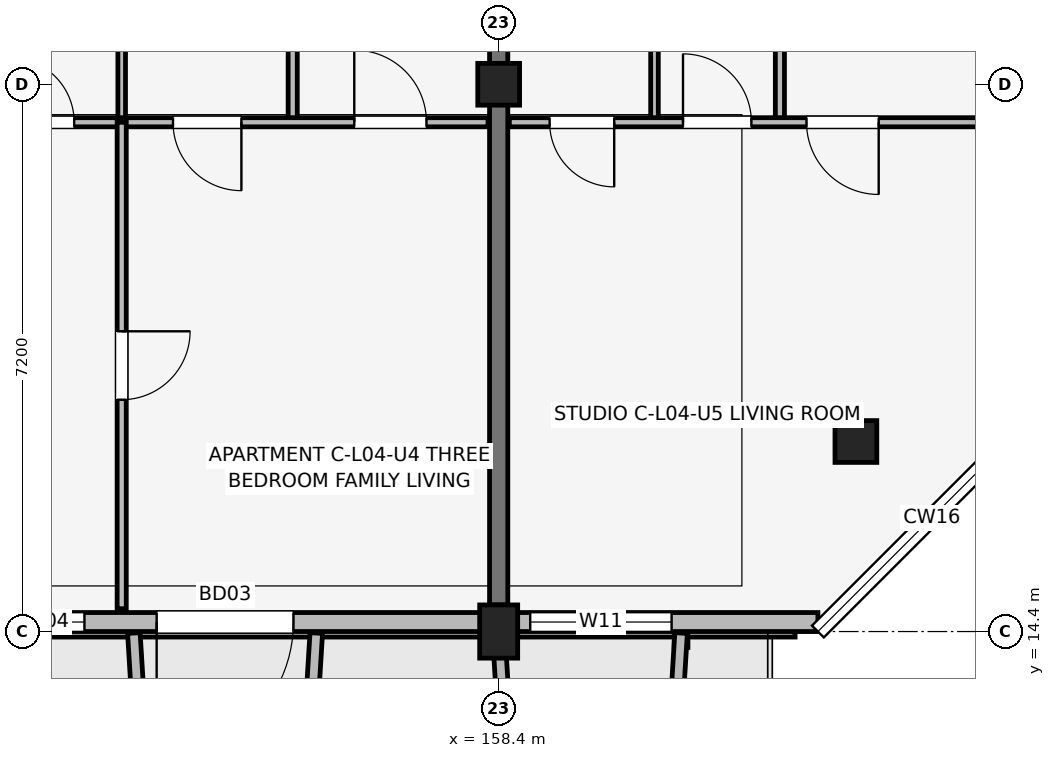
"""IFC4 building model, lengths in metres.
Left out: names, types, materials, properties, quantities, classifications, styles, units other than length and angle.
Written with IfcOpenShell. Run it as: python <this file> out.ifc"""

import sys

from ifc_helpers import new_model, si_unit, direction, frame, frame_2d, origin, origin_2d, place, context, subcontext, project, spatial, rectangle, extrude, element, fill, save


model = new_model("IFC4")
c1 = context("Model", 3, precision=1e-05, world=origin(), true_north=direction((0.0, 1.0)))
c2 = subcontext(c1, "Body", "Model", "MODEL_VIEW")
j1 = project(units=[si_unit("LENGTHUNIT", "METRE"), si_unit("PLANEANGLEUNIT", "RADIAN")], contexts=[c1])
p1 = place(None, origin())
s1 = spatial("IfcSite", under=j1, at=p1, CompositionType="ELEMENT")
p2 = place(p1, origin())
s2 = spatial("IfcBuilding", under=s1, at=p2, CompositionType="ELEMENT")
p3 = place(p2, frame((0.0, 0.0, 15.0)))
s3 = spatial("IfcBuildingStorey", under=s2, at=p3, CompositionType="ELEMENT", Elevation=15.0)
p4 = place(p3, frame((158.4, 14.4, 0.0), z_axis=(0.0, 0.0, 1.0), x_axis=(1.0, 0.0, 0.0)))
e1 = element("IfcColumn", 1, at=p4, inside=s3, PredefinedType="COLUMN", context=c2, shape_type="SweptSolid", body=[
    extrude(rectangle(XDim=0.5, YDim=0.7, at=origin_2d()), origin(), (0.0, 0.0, 1.0), 3.15),
])
for number, where, z_axis, x_axis in (
    (2, (158.4, 21.6, 0.0), (0.0, 0.0, 1.0), (1.0, 0.0, 0.0)),
    (3, (163.1, 16.9, 0.0), (0.0, 0.0, 1.0), (1.0, 0.0, 0.0)),
):
    element("IfcColumn", number, at=place(p3, frame(where, z_axis=z_axis, x_axis=x_axis)), inside=s3, PredefinedType="COLUMN", context=c2, shape_type="SweptSolid", body=[
        extrude(rectangle(XDim=0.55, YDim=0.55, at=origin_2d()), origin(), (0.0, 0.0, 1.0), 3.15),
    ])
p5 = place(p3, frame((158.4, 14.75, 0.0), z_axis=(0.0, 0.0, 1.0), x_axis=(0.0, 1.0, 0.0)))
e4 = element("IfcWall", 4, at=p5, inside=s3, PredefinedType="SHEAR", context=c2, shape_type="SweptSolid", body=[
    extrude(rectangle(XDim=9.4, YDim=0.24, at=frame_2d((4.7, 0.0))), origin(), (0.0, 0.0, 1.0), 3.15),
])
p6 = place(p3, frame((132.6, 14.525, 0.0), z_axis=(0.0, 0.0, 1.0), x_axis=(1.0, 0.0, 0.0)))
e5 = element("IfcWall", 5, at=p6, inside=s3, PredefinedType="SOLIDWALL", context=c2, shape_type="SweptSolid", body=[
    extrude(rectangle(XDim=30.0, YDim=0.25, at=frame_2d((15.0, 0.0))), origin(), (0.0, 0.0, 1.0), 2.43),
])
p7 = place(p6, frame((8.55, 0.0, 0.0), z_axis=(0.0, 0.0, 1.0), x_axis=(-1.0, 0.0, 0.0)))
e6 = element("IfcOpeningElement", 6, at=p7, cuts=e5, PredefinedType="OPENING", context=c2, shape_type="SweptSolid", body=[
    extrude(rectangle(XDim=1.5, YDim=2.15, at=frame_2d((0.75, 1.075))), frame((0.0, 0.135, 0.0), z_axis=(0.0, -1.0, 0.0), x_axis=(1.0, 0.0, 0.0)), (0.0, 0.0, 1.0), 0.27),
])
p8 = place(p6, frame((23.1, 0.0, 0.0), z_axis=(0.0, 0.0, 1.0), x_axis=(-1.0, 0.0, 0.0)))
e7 = element("IfcOpeningElement", 7, at=p8, cuts=e5, PredefinedType="OPENING", context=c2, shape_type="SweptSolid", body=[
    extrude(rectangle(XDim=1.8, YDim=2.15, at=frame_2d((0.9, 1.075))), frame((0.0, 0.135, 0.0), z_axis=(0.0, -1.0, 0.0), x_axis=(1.0, 0.0, 0.0)), (0.0, 0.0, 1.0), 0.27),
])
p9 = place(p6, frame((2.555, 0.0, 0.75)))
e8 = element("IfcOpeningElement", 8, at=p9, cuts=e5, PredefinedType="OPENING", context=c2, shape_type="SweptSolid", body=[
    extrude(rectangle(XDim=1.22, YDim=1.5, at=frame_2d((0.61, 0.75))), frame((0.0, 0.135, 0.0), z_axis=(0.0, -1.0, 0.0), x_axis=(1.0, 0.0, 0.0)), (0.0, 0.0, 1.0), 0.27),
])
p10 = place(p6, frame((5.035, 0.0, 0.75)))
e9 = element("IfcOpeningElement", 9, at=p10, cuts=e5, PredefinedType="OPENING", context=c2, shape_type="SweptSolid", body=[
    extrude(rectangle(XDim=0.6, YDim=1.25, at=frame_2d((0.3, 0.625))), frame((0.0, 0.135, 0.0), z_axis=(0.0, -1.0, 0.0), x_axis=(1.0, 0.0, 0.0)), (0.0, 0.0, 1.0), 0.27),
])
p11 = place(p6, frame((12.3, 0.0, 0.75)))
e10 = element("IfcOpeningElement", 10, at=p11, cuts=e5, PredefinedType="OPENING", context=c2, shape_type="SweptSolid", body=[
    extrude(rectangle(XDim=0.72, YDim=1.35, at=frame_2d((0.36, 0.675))), frame((0.0, 0.135, 0.0), z_axis=(0.0, -1.0, 0.0), x_axis=(1.0, 0.0, 0.0)), (0.0, 0.0, 1.0), 0.27),
])
p12 = place(p6, frame((14.0, 0.0, 0.67)))
e11 = element("IfcOpeningElement", 11, at=p12, cuts=e5, PredefinedType="OPENING", context=c2, shape_type="SweptSolid", body=[
    extrude(rectangle(XDim=2.0, YDim=1.65, at=frame_2d((1.0, 0.825))), frame((0.0, 0.135, 0.0), z_axis=(0.0, -1.0, 0.0), x_axis=(1.0, 0.0, 0.0)), (0.0, 0.0, 1.0), 0.27),
])
p13 = place(p6, frame((19.37, 0.0, 0.75)))
e12 = element("IfcOpeningElement", 12, at=p13, cuts=e5, PredefinedType="OPENING", context=c2, shape_type="SweptSolid", body=[
    extrude(rectangle(XDim=0.98, YDim=1.45, at=frame_2d((0.49, 0.725))), frame((0.0, 0.135, 0.0), z_axis=(0.0, -1.0, 0.0), x_axis=(1.0, 0.0, 0.0)), (0.0, 0.0, 1.0), 0.27),
])
p14 = place(p6, frame((26.215, 0.0, 0.7)))
e13 = element("IfcOpeningElement", 13, at=p14, cuts=e5, PredefinedType="OPENING", context=c2, shape_type="SweptSolid", body=[
    extrude(rectangle(XDim=1.86, YDim=1.6, at=frame_2d((0.93, 0.8))), frame((0.0, 0.135, 0.0), z_axis=(0.0, -1.0, 0.0), x_axis=(1.0, 0.0, 0.0)), (0.0, 0.0, 1.0), 0.27),
])
for number, where, z_axis, x_axis in (
    (14, (153.6, 14.38, 0.0), (0.0, 0.0, 1.0), (0.061, -0.998, 0.0)),
    (15, (156.0, 14.38, 0.0), (0.0, 0.0, 1.0), (-0.061, -0.998, 0.0)),
):
    element("IfcWall", number, at=place(p3, frame(where, z_axis=z_axis, x_axis=x_axis)), inside=s3, PredefinedType="ELEMENTEDWALL", context=c2, shape_type="SweptSolid", body=[
        extrude(rectangle(XDim=1.964, YDim=0.165, at=frame_2d((0.982, 0.0))), origin(), (0.0, 0.0, 1.0), 2.45),
    ])
for number, where, z_axis, x_axis in (
    (16, (158.4, 14.38, 0.0), (0.0, 0.0, 1.0), (0.061, -0.998, 0.0)),
    (17, (160.8, 14.38, 0.0), (0.0, 0.0, 1.0), (-0.061, -0.998, 0.0)),
):
    element("IfcWall", number, at=place(p3, frame(where, z_axis=z_axis, x_axis=x_axis)), inside=s3, PredefinedType="ELEMENTEDWALL", context=c2, shape_type="SweptSolid", body=[
        extrude(rectangle(XDim=1.964, YDim=0.165, at=frame_2d((0.982, 0.0))), origin(), (0.0, 0.0, 1.0), 2.95),
    ])
p15 = place(p3, frame((153.44, 21.1, 0.0), z_axis=(0.0, 0.0, 1.0), x_axis=(0.0, 1.0, 0.0)))
e18 = element("IfcWall", 18, at=p15, inside=s3, PredefinedType="PARTITIONING", context=c2, shape_type="SweptSolid", body=[
    extrude(rectangle(XDim=3.2, YDim=0.1, at=frame_2d((1.6, 0.0))), origin(), (0.0, 0.0, 1.0), 2.375),
])
p16 = place(p3, frame((155.69, 21.1, 0.0), z_axis=(0.0, 0.0, 1.0), x_axis=(0.0, 1.0, 0.0)))
e19 = element("IfcWall", 19, at=p16, inside=s3, PredefinedType="PARTITIONING", context=c2, shape_type="SweptSolid", body=[
    extrude(rectangle(XDim=3.2, YDim=0.12, at=frame_2d((1.6, 0.0))), origin(), (0.0, 0.0, 1.0), 2.375),
])
p17 = place(p3, frame((151.34, 21.1, 0.0), z_axis=(0.0, 0.0, 1.0), x_axis=(1.0, 0.0, 0.0)))
e20 = element("IfcWall", 20, at=p17, inside=s3, PredefinedType="PARTITIONING", context=c2, shape_type="SweptSolid", body=[
    extrude(rectangle(XDim=6.92, YDim=0.12, at=frame_2d((3.46, 0.0))), origin(), (0.0, 0.0, 1.0), 2.38),
])
p18 = place(p17, frame((0.625, 0.0, 0.0)))
e21 = element("IfcOpeningElement", 21, at=p18, cuts=e20, PredefinedType="OPENING", context=c2, shape_type="SweptSolid", body=[
    extrude(rectangle(XDim=0.85, YDim=2.08, at=frame_2d((0.425, 1.04))), frame((0.0, 0.07, 0.0), z_axis=(0.0, -1.0, 0.0), x_axis=(1.0, 0.0, 0.0)), (0.0, 0.0, 1.0), 0.14),
])
p19 = place(p17, frame((3.675, 0.0, 0.0), z_axis=(0.0, 0.0, 1.0), x_axis=(-1.0, 0.0, 0.0)))
e22 = element("IfcOpeningElement", 22, at=p19, cuts=e20, PredefinedType="OPENING", context=c2, shape_type="SweptSolid", body=[
    extrude(rectangle(XDim=0.9, YDim=2.08, at=frame_2d((0.45, 1.04))), frame((0.0, 0.07, 0.0), z_axis=(0.0, -1.0, 0.0), x_axis=(1.0, 0.0, 0.0)), (0.0, 0.0, 1.0), 0.14),
])
p20 = place(p17, frame((5.16, 0.0, 0.0)))
e23 = element("IfcOpeningElement", 23, at=p20, cuts=e20, PredefinedType="OPENING", context=c2, shape_type="SweptSolid", body=[
    extrude(rectangle(XDim=0.95, YDim=2.08, at=frame_2d((0.475, 1.04))), frame((0.0, 0.07, 0.0), z_axis=(0.0, -1.0, 0.0), x_axis=(1.0, 0.0, 0.0)), (0.0, 0.0, 1.0), 0.14),
])
p21 = place(p3, frame((153.44, 14.7, 0.0), z_axis=(0.0, 0.0, 1.0), x_axis=(0.0, 1.0, 0.0)))
e24 = element("IfcWall", 24, at=p21, inside=s3, PredefinedType="PARTITIONING", context=c2, shape_type="SweptSolid", body=[
    extrude(rectangle(XDim=6.4, YDim=0.12, at=frame_2d((3.2, 0.0))), origin(), (0.0, 0.0, 1.0), 2.38),
])
p22 = place(p21, frame((3.65, 0.0, 0.0), z_axis=(0.0, 0.0, 1.0), x_axis=(-1.0, 0.0, 0.0)))
e25 = element("IfcOpeningElement", 25, at=p22, cuts=e24, PredefinedType="OPENING", context=c2, shape_type="SweptSolid", body=[
    extrude(rectangle(XDim=0.9, YDim=2.08, at=frame_2d((0.45, 1.04))), frame((0.0, 0.07, 0.0), z_axis=(0.0, -1.0, 0.0), x_axis=(1.0, 0.0, 0.0)), (0.0, 0.0, 1.0), 0.14),
])
p23 = place(p3, frame((160.45, 21.1, 0.0), z_axis=(0.0, 0.0, 1.0), x_axis=(0.0, 1.0, 0.0)))
e26 = element("IfcWall", 26, at=p23, inside=s3, PredefinedType="PARTITIONING", context=c2, shape_type="SweptSolid", body=[
    extrude(rectangle(XDim=3.2, YDim=0.1, at=frame_2d((1.6, 0.0))), origin(), (0.0, 0.0, 1.0), 2.375),
])
p24 = place(p3, frame((162.1, 21.1, 0.0), z_axis=(0.0, 0.0, 1.0), x_axis=(0.0, 1.0, 0.0)))
e27 = element("IfcWall", 27, at=p24, inside=s3, PredefinedType="PARTITIONING", context=c2, shape_type="SweptSolid", body=[
    extrude(rectangle(XDim=3.2, YDim=0.12, at=frame_2d((1.6, 0.0))), origin(), (0.0, 0.0, 1.0), 2.375),
])
p25 = place(p3, frame((158.54, 21.1, 0.0), z_axis=(0.0, 0.0, 1.0), x_axis=(1.0, 0.0, 0.0)))
e28 = element("IfcWall", 28, at=p25, inside=s3, PredefinedType="PARTITIONING", context=c2, shape_type="SweptSolid", body=[
    extrude(rectangle(XDim=6.92, YDim=0.12, at=frame_2d((3.46, 0.0))), origin(), (0.0, 0.0, 1.0), 2.38),
])
p26 = place(p25, frame((1.38, 0.0, 0.0), z_axis=(0.0, 0.0, 1.0), x_axis=(-1.0, 0.0, 0.0)))
e29 = element("IfcOpeningElement", 29, at=p26, cuts=e28, PredefinedType="OPENING", context=c2, shape_type="SweptSolid", body=[
    extrude(rectangle(XDim=0.85, YDim=2.08, at=frame_2d((0.425, 1.04))), frame((0.0, 0.07, 0.0), z_axis=(0.0, -1.0, 0.0), x_axis=(1.0, 0.0, 0.0)), (0.0, 0.0, 1.0), 0.14),
])
p27 = place(p25, frame((2.285, 0.0, 0.0)))
e30 = element("IfcOpeningElement", 30, at=p27, cuts=e28, PredefinedType="OPENING", context=c2, shape_type="SweptSolid", body=[
    extrude(rectangle(XDim=0.9, YDim=2.08, at=frame_2d((0.45, 1.04))), frame((0.0, 0.07, 0.0), z_axis=(0.0, -1.0, 0.0), x_axis=(1.0, 0.0, 0.0)), (0.0, 0.0, 1.0), 0.14),
])
p28 = place(p25, frame((4.86, 0.0, 0.0), z_axis=(0.0, 0.0, 1.0), x_axis=(-1.0, 0.0, 0.0)))
e31 = element("IfcOpeningElement", 31, at=p28, cuts=e28, PredefinedType="OPENING", context=c2, shape_type="SweptSolid", body=[
    extrude(rectangle(XDim=0.95, YDim=2.08, at=frame_2d((0.475, 1.04))), frame((0.0, 0.07, 0.0), z_axis=(0.0, -1.0, 0.0), x_axis=(1.0, 0.0, 0.0)), (0.0, 0.0, 1.0), 0.14),
])
p29 = place(p8, origin())
e32 = element("IfcDoor", 32, at=p29, inside=s3, OperationType="SINGLE_SWING_LEFT", PredefinedType="DOOR", context=c2, shape_type="SweptSolid", body=[
    extrude(rectangle(XDim=1.8, YDim=2.15, at=frame_2d((0.9, 1.075))), frame((0.0, 0.025, 0.0), z_axis=(0.0, -1.0, 0.0), x_axis=(1.0, 0.0, 0.0)), (0.0, 0.0, 1.0), 0.05),
])
fill(e7, e32)
p30 = place(p13, origin())
e33 = element("IfcWindow", 33, at=p30, inside=s3, PartitioningType="SINGLE_PANEL", PredefinedType="WINDOW", context=c2, shape_type="SweptSolid", body=[
    extrude(rectangle(XDim=0.98, YDim=1.45, at=frame_2d((0.49, 0.725))), frame((0.0, 0.03, 0.0), z_axis=(0.0, -1.0, 0.0), x_axis=(1.0, 0.0, 0.0)), (0.0, 0.0, 1.0), 0.06),
])
fill(e12, e33)
p31 = place(p14, origin())
e34 = element("IfcWindow", 34, at=p31, inside=s3, PartitioningType="SINGLE_PANEL", PredefinedType="WINDOW", context=c2, shape_type="SweptSolid", body=[
    extrude(rectangle(XDim=1.86, YDim=1.6, at=frame_2d((0.93, 0.8))), frame((0.0, 0.03, 0.0), z_axis=(0.0, -1.0, 0.0), x_axis=(1.0, 0.0, 0.0)), (0.0, 0.0, 1.0), 0.06),
])
fill(e13, e34)
p32 = place(p18, origin())
e35 = element("IfcDoor", 35, at=p32, inside=s3, OperationType="SINGLE_SWING_LEFT", PredefinedType="DOOR", context=c2, shape_type="SweptSolid", body=[
    extrude(rectangle(XDim=0.85, YDim=2.08, at=frame_2d((0.425, 1.04))), frame((0.0, 0.025, 0.0), z_axis=(0.0, -1.0, 0.0), x_axis=(1.0, 0.0, 0.0)), (0.0, 0.0, 1.0), 0.05),
])
fill(e21, e35)
p33 = place(p19, origin())
e36 = element("IfcDoor", 36, at=p33, inside=s3, OperationType="SINGLE_SWING_RIGHT", PredefinedType="DOOR", context=c2, shape_type="SweptSolid", body=[
    extrude(rectangle(XDim=0.9, YDim=2.08, at=frame_2d((0.45, 1.04))), frame((0.0, 0.025, 0.0), z_axis=(0.0, -1.0, 0.0), x_axis=(1.0, 0.0, 0.0)), (0.0, 0.0, 1.0), 0.05),
])
fill(e22, e36)
p34 = place(p20, origin())
e37 = element("IfcDoor", 37, at=p34, inside=s3, OperationType="SINGLE_SWING_LEFT", PredefinedType="DOOR", context=c2, shape_type="SweptSolid", body=[
    extrude(rectangle(XDim=0.95, YDim=2.08, at=frame_2d((0.475, 1.04))), frame((0.0, 0.025, 0.0), z_axis=(0.0, -1.0, 0.0), x_axis=(1.0, 0.0, 0.0)), (0.0, 0.0, 1.0), 0.05),
])
fill(e23, e37)
p35 = place(p22, origin())
e38 = element("IfcDoor", 38, at=p35, inside=s3, OperationType="SINGLE_SWING_RIGHT", PredefinedType="DOOR", context=c2, shape_type="SweptSolid", body=[
    extrude(rectangle(XDim=0.9, YDim=2.08, at=frame_2d((0.45, 1.04))), frame((0.0, 0.025, 0.0), z_axis=(0.0, -1.0, 0.0), x_axis=(1.0, 0.0, 0.0)), (0.0, 0.0, 1.0), 0.05),
])
fill(e25, e38)
p36 = place(p26, origin())
e39 = element("IfcDoor", 39, at=p36, inside=s3, OperationType="SINGLE_SWING_RIGHT", PredefinedType="DOOR", context=c2, shape_type="SweptSolid", body=[
    extrude(rectangle(XDim=0.85, YDim=2.08, at=frame_2d((0.425, 1.04))), frame((0.0, 0.025, 0.0), z_axis=(0.0, -1.0, 0.0), x_axis=(1.0, 0.0, 0.0)), (0.0, 0.0, 1.0), 0.05),
])
fill(e29, e39)
p37 = place(p27, origin())
e40 = element("IfcDoor", 40, at=p37, inside=s3, OperationType="SINGLE_SWING_LEFT", PredefinedType="DOOR", context=c2, shape_type="SweptSolid", body=[
    extrude(rectangle(XDim=0.9, YDim=2.08, at=frame_2d((0.45, 1.04))), frame((0.0, 0.025, 0.0), z_axis=(0.0, -1.0, 0.0), x_axis=(1.0, 0.0, 0.0)), (0.0, 0.0, 1.0), 0.05),
])
fill(e30, e40)
p38 = place(p28, origin())
e41 = element("IfcDoor", 41, at=p38, inside=s3, OperationType="SINGLE_SWING_RIGHT", PredefinedType="DOOR", context=c2, shape_type="SweptSolid", body=[
    extrude(rectangle(XDim=0.95, YDim=2.08, at=frame_2d((0.475, 1.04))), frame((0.0, 0.025, 0.0), z_axis=(0.0, -1.0, 0.0), x_axis=(1.0, 0.0, 0.0)), (0.0, 0.0, 1.0), 0.05),
])
fill(e31, e41)
save(model, sys.argv[1])
